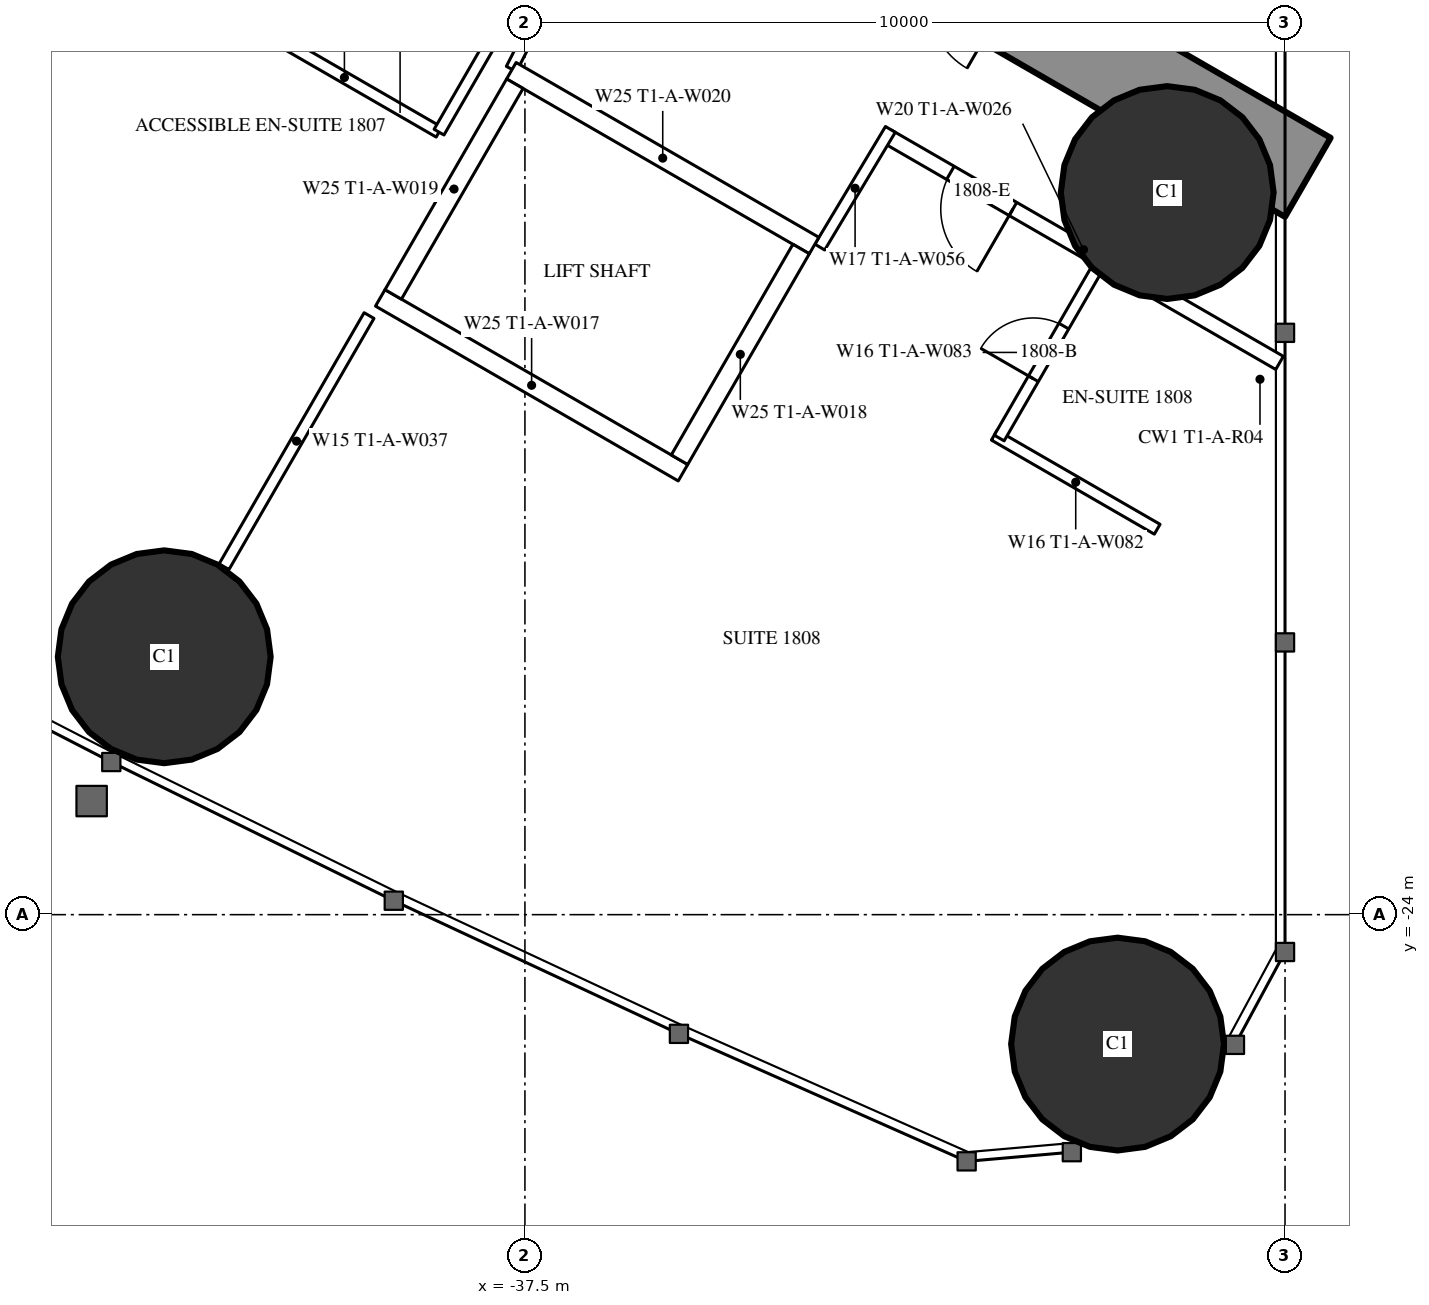
"""IFC4 building model, lengths in metres.
Left out: names, types, materials, properties, quantities, classifications, styles, units other than length and angle.
Written with IfcOpenShell. Run it as: python <this file> out.ifc"""

import sys

from ifc_helpers import new_model, si_unit, direction, frame, frame_2d, origin, origin_2d, place, context, subcontext, project, spatial, rectangle, hollow_circle, extrude, element, fill, save


model = new_model("IFC4")
c1 = context("Model", 3, precision=1e-05, world=origin(), true_north=direction((0.0, 1.0)))
c2 = subcontext(c1, "Body", "Model", "MODEL_VIEW")
j1 = project(units=[si_unit("LENGTHUNIT", "METRE"), si_unit("PLANEANGLEUNIT", "RADIAN")], contexts=[c1])
p1 = place(None, origin())
s1 = spatial("IfcSite", under=j1, at=p1, CompositionType="ELEMENT")
p2 = place(p1, origin())
s2 = spatial("IfcBuilding", under=s1, at=p2, CompositionType="ELEMENT")
p3 = place(p2, frame((0.0, 0.0, 70.5)))
s3 = spatial("IfcBuildingStorey", under=s2, at=p3, CompositionType="ELEMENT", Elevation=70.5)
for number, where, z_axis, x_axis in (
    (1, (-29.703, -25.703, 0.0), (0.0, 0.0, 1.0), (1.0, 0.0, 0.0)),
    (2, (-29.05, -14.5, 0.0), (0.0, 0.0, 1.0), (1.0, 0.0, 0.0)),
    (3, (-42.245, -20.607, 0.0), (0.0, 0.0, 1.0), (1.0, 0.0, 0.0)),
):
    element("IfcColumn", number, at=place(p3, frame(where, z_axis=z_axis, x_axis=x_axis)), inside=s3, PredefinedType="COLUMN", context=c2, shape_type="SweptSolid", body=[
        extrude(hollow_circle(Radius=1.4, WallThickness=0.12, at=origin_2d()), origin(), (0.0, 0.0, 1.0), 3.5),
    ])
p4 = place(p3, frame((-27.2, -14.3, 0.0), z_axis=(0.0, 0.0, 1.0), x_axis=(-0.866024021859, 0.500002393557, 0.0)))
e4 = element("IfcWall", 4, at=p4, inside=s3, PredefinedType="SHEAR", context=c2, shape_type="SweptSolid", body=[
    extrude(rectangle(XDim=27.907, YDim=1.2, at=frame_2d((13.954, 0.0))), origin(), (0.0, 0.0, 1.0), 3.5),
])
p5 = place(p4, frame((4.6, 0.0, 0.0)))
e5 = element("IfcOpeningElement", 5, at=p5, cuts=e4, PredefinedType="OPENING", context=c2, shape_type="SweptSolid", body=[
    extrude(rectangle(XDim=1.0, YDim=2.2, at=frame_2d((0.5, 1.1))), frame((0.0, 0.61, 0.0), z_axis=(0.0, -1.0, 0.0), x_axis=(1.0, 0.0, 0.0)), (0.0, 0.0, 1.0), 1.22),
])
p6 = place(p4, frame((13.395, 0.0, 0.0)))
e6 = element("IfcOpeningElement", 6, at=p6, cuts=e4, PredefinedType="OPENING", context=c2, shape_type="SweptSolid", body=[
    extrude(rectangle(XDim=1.8, YDim=2.2, at=frame_2d((0.9, 1.1))), frame((0.0, 0.61, 0.0), z_axis=(0.0, -1.0, 0.0), x_axis=(1.0, 0.0, 0.0)), (0.0, 0.0, 1.0), 1.22),
])
p7 = place(p3, frame((-39.551, -16.118, 0.0), z_axis=(0.0, 0.0, 1.0), x_axis=(-0.499986503906, -0.866033195618, 0.0)))
e7 = element("IfcWall", 7, at=p7, inside=s3, PredefinedType="PARTITIONING", context=c2, shape_type="SweptSolid", body=[
    extrude(rectangle(XDim=3.815, YDim=0.15, at=frame_2d((1.907, 0.0))), origin(), (0.0, 0.0, 1.0), 3.25),
])
p8 = place(p3, frame((-27.572, -16.741, 0.0), z_axis=(0.0, 0.0, 1.0), x_axis=(-0.866024464444, 0.500001626982, 0.0)))
e8 = element("IfcWall", 8, at=p8, inside=s3, PredefinedType="PARTITIONING", context=c2, shape_type="SweptSolid", body=[
    extrude(rectangle(XDim=5.955, YDim=0.2, at=frame_2d((2.978, 0.0))), origin(), (0.0, 0.0, 1.0), 3.25),
])
p9 = place(p8, frame((4.05, 0.0, 0.0)))
e9 = element("IfcOpeningElement", 9, at=p9, cuts=e8, PredefinedType="OPENING", context=c2, shape_type="SweptSolid", body=[
    extrude(rectangle(XDim=0.95, YDim=2.2, at=frame_2d((0.475, 1.1))), frame((0.0, 0.11, 0.0), z_axis=(0.0, -1.0, 0.0), x_axis=(1.0, 0.0, 0.0)), (0.0, 0.0, 1.0), 0.22),
])
p10 = place(p3, frame((-36.857, -11.265, 0.0), z_axis=(0.0, 0.0, 1.0), x_axis=(-0.454225294761, -0.890886851176, 0.0)))
e10 = element("IfcWall", 10, at=p10, inside=s3, PredefinedType="PARTITIONING", context=c2, shape_type="SweptSolid", body=[
    extrude(rectangle(XDim=1.807, YDim=0.15, at=frame_2d((0.904, 0.0))), origin(), (0.0, 0.0, 1.0), 3.25),
])
p11 = place(p3, frame((-33.621, -15.218, 0.0), z_axis=(0.0, 0.0, 1.0), x_axis=(0.514336634837, 0.857588377991, 0.0)))
e11 = element("IfcWall", 11, at=p11, inside=s3, PredefinedType="PARTITIONING", context=c2, shape_type="SweptSolid", body=[
    extrude(rectangle(XDim=1.805, YDim=0.15, at=frame_2d((0.903, 0.0))), origin(), (0.0, 0.0, 1.0), 3.25),
])
p12 = place(p3, frame((-38.63, -13.705, 0.0), z_axis=(0.0, 0.0, 1.0), x_axis=(-0.866018712932, 0.500011588718, 0.0)))
e12 = element("IfcWall", 12, at=p12, inside=s3, PredefinedType="PARTITIONING", context=c2, shape_type="SweptSolid", body=[
    extrude(rectangle(XDim=2.875, YDim=0.15, at=frame_2d((1.438, 0.0))), origin(), (0.0, 0.0, 1.0), 3.25),
])
p13 = place(p3, frame((-37.23, -11.281, 0.0), z_axis=(0.0, 0.0, 1.0), x_axis=(-0.500049511043, -0.865996816683, 0.0)))
e13 = element("IfcWall", 13, at=p13, inside=s3, PredefinedType="PARTITIONING", context=c2, shape_type="SweptSolid", body=[
    extrude(rectangle(XDim=2.8, YDim=0.15, at=frame_2d((1.4, 0.0))), origin(), (0.0, 0.0, 1.0), 3.25),
])
p14 = place(p3, frame((-29.182, -18.929, 0.0), z_axis=(0.0, 0.0, 1.0), x_axis=(-0.866006523861, 0.500032699561, 0.0)))
e14 = element("IfcWall", 14, at=p14, inside=s3, PredefinedType="PARTITIONING", context=c2, shape_type="SweptSolid", body=[
    extrude(rectangle(XDim=2.475, YDim=0.15, at=frame_2d((1.237, 0.0))), origin(), (0.0, 0.0, 1.0), 3.25),
])
p15 = place(p3, frame((-29.96, -15.478, 0.0), z_axis=(0.0, 0.0, 1.0), x_axis=(-0.500006934395, -0.866021400173, 0.0)))
e15 = element("IfcWall", 15, at=p15, inside=s3, PredefinedType="PARTITIONING", context=c2, shape_type="SweptSolid", body=[
    extrude(rectangle(XDim=2.6, YDim=0.15, at=frame_2d((1.3, 0.0))), origin(), (0.0, 0.0, 1.0), 3.25),
])
p16 = place(p15, frame((0.9, 0.0, 0.0)))
e16 = element("IfcOpeningElement", 16, at=p16, cuts=e15, PredefinedType="OPENING", context=c2, shape_type="SweptSolid", body=[
    extrude(rectangle(XDim=0.8, YDim=2.2, at=frame_2d((0.4, 1.1))), frame((0.0, 0.085, 0.0), z_axis=(0.0, -1.0, 0.0), x_axis=(1.0, 0.0, 0.0)), (0.0, 0.0, 1.0), 0.17),
])
p17 = place(p3, frame((-33.696, -15.197, 0.0), z_axis=(0.0, 0.0, 1.0), x_axis=(-0.865976953817, 0.500083908417, 0.0)))
e17 = element("IfcWall", 17, at=p17, inside=s3, PredefinedType="PARTITIONING", context=c2, shape_type="SweptSolid", body=[
    extrude(rectangle(XDim=4.599, YDim=0.25, at=frame_2d((2.3, 0.0))), origin(), (0.0, 0.0, 1.0), 3.25),
])
p18 = place(p3, frame((-35.42, -18.186, 0.0), z_axis=(0.0, 0.0, 1.0), x_axis=(-0.865990227814, 0.50006092162, 0.0)))
e18 = element("IfcWall", 18, at=p18, inside=s3, PredefinedType="PARTITIONING", context=c2, shape_type="SweptSolid", body=[
    extrude(rectangle(XDim=4.6, YDim=0.25, at=frame_2d((2.3, 0.0))), origin(), (0.0, 0.0, 1.0), 3.25),
])
p19 = place(p3, frame((-33.866, -15.243, 0.0), z_axis=(0.0, 0.0, 1.0), x_axis=(-0.499929347863, -0.866066190972, 0.0)))
e19 = element("IfcWall", 19, at=p19, inside=s3, PredefinedType="PARTITIONING", context=c2, shape_type="SweptSolid", body=[
    extrude(rectangle(XDim=3.201, YDim=0.25, at=frame_2d((1.6, 0.0))), origin(), (0.0, 0.0, 1.0), 3.25),
])
p20 = place(p3, frame((-37.633, -13.068, 0.0), z_axis=(0.0, 0.0, 1.0), x_axis=(-0.499872130319, -0.866099216793, 0.0)))
e20 = element("IfcWall", 20, at=p20, inside=s3, PredefinedType="PARTITIONING", context=c2, shape_type="SweptSolid", body=[
    extrude(rectangle(XDim=3.2, YDim=0.25, at=frame_2d((1.6, 0.0))), origin(), (0.0, 0.0, 1.0), 3.25),
])
p21 = place(p16, origin())
e21 = element("IfcDoor", 21, at=p21, inside=s3, OperationType="SINGLE_SWING_RIGHT", PredefinedType="DOOR", context=c2, shape_type="SweptSolid", body=[
    extrude(rectangle(XDim=0.8, YDim=2.2, at=frame_2d((0.4, 1.1))), frame((0.0, 0.025, 0.0), z_axis=(0.0, -1.0, 0.0), x_axis=(1.0, 0.0, 0.0)), (0.0, 0.0, 1.0), 0.05),
])
fill(e16, e21)
p22 = place(p9, origin())
e22 = element("IfcDoor", 22, at=p22, inside=s3, OperationType="SINGLE_SWING_LEFT", PredefinedType="DOOR", context=c2, shape_type="SweptSolid", body=[
    extrude(rectangle(XDim=0.95, YDim=2.2, at=frame_2d((0.475, 1.1))), frame((0.0, 0.025, 0.0), z_axis=(0.0, -1.0, 0.0), x_axis=(1.0, 0.0, 0.0)), (0.0, 0.0, 1.0), 0.05),
])
fill(e9, e22)
save(model, sys.argv[1])
